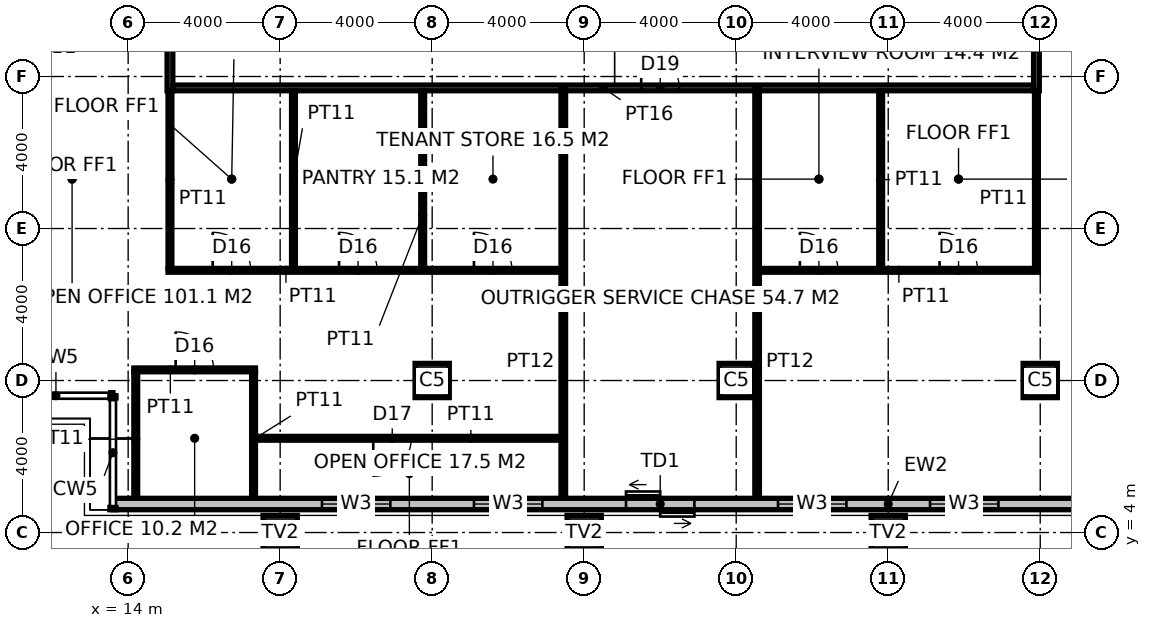
"""IFC4 building model, lengths in metres.
Left out: names, types, materials, properties, quantities, classifications, styles, units other than length and angle.
Written with IfcOpenShell. Run it as: python <this file> out.ifc"""

import sys

from ifc_helpers import new_model, si_unit, direction, frame, frame_2d, origin, origin_2d, place, context, subcontext, project, spatial, rectangle, hollow_rectangle, extrude, element, fill, save


model = new_model("IFC4")
c1 = context("Model", 3, precision=1e-05, world=origin(), true_north=direction((0.0, 1.0)))
c2 = subcontext(c1, "Body", "Model", "MODEL_VIEW")
j1 = project(units=[si_unit("LENGTHUNIT", "METRE"), si_unit("PLANEANGLEUNIT", "RADIAN")], contexts=[c1])
p1 = place(None, origin())
s1 = spatial("IfcSite", under=j1, at=p1, CompositionType="ELEMENT")
p2 = place(p1, origin())
s2 = spatial("IfcBuilding", under=s1, at=p2, CompositionType="ELEMENT")
p3 = place(p2, frame((0.0, 0.0, 105.4)))
s3 = spatial("IfcBuildingStorey", under=s2, at=p3, CompositionType="ELEMENT", Elevation=105.4)
for number, where, z_axis, x_axis in (
    (1, (18.0, 4.0, 0.0), (0.0, 0.0, 1.0), (1.0, 0.0, 0.0)),
    (2, (26.0, 4.0, 0.0), (0.0, 0.0, 1.0), (1.0, 0.0, 0.0)),
    (3, (34.0, 4.0, 0.0), (0.0, 0.0, 1.0), (1.0, 0.0, 0.0)),
):
    element("IfcColumn", number, at=place(p3, frame(where, z_axis=z_axis, x_axis=x_axis)), inside=s3, PredefinedType="USERDEFINED", context=c2, shape_type="SweptSolid", body=[
        extrude(hollow_rectangle(XDim=0.9, YDim=0.9, WallThickness=0.1, at=origin_2d()), origin(), (0.0, 0.0, 1.0), 4.0),
    ])
for number, where, z_axis, x_axis in (
    (4, (22.0, 8.0, 0.0), (0.0, 0.0, 1.0), (1.0, 0.0, 0.0)),
    (5, (30.0, 8.0, 0.0), (0.0, 0.0, 1.0), (1.0, 0.0, 0.0)),
    (6, (38.0, 8.0, 0.0), (0.0, 0.0, 1.0), (1.0, 0.0, 0.0)),
):
    element("IfcColumn", number, at=place(p3, frame(where, z_axis=z_axis, x_axis=x_axis)), inside=s3, PredefinedType="COLUMN", context=c2, shape_type="SweptSolid", body=[
        extrude(hollow_rectangle(XDim=0.9, YDim=0.9, WallThickness=0.1, at=origin_2d()), origin(), (0.0, 0.0, 1.0), 4.0),
    ])
p4 = place(p3, frame((15.1, 15.625, 0.0), z_axis=(0.0, 0.0, 1.0), x_axis=(0.0, 1.0, 0.0)))
e7 = element("IfcWall", 7, at=p4, inside=s3, PredefinedType="PARTITIONING", context=c2, shape_type="SweptSolid", body=[
    extrude(rectangle(XDim=22.75, YDim=0.15, at=frame_2d((11.375, 0.0))), origin(), (0.0, 0.0, 1.0), 3.85),
])
p5 = place(p4, frame((3.074, 0.0, 0.0)))
e8 = element("IfcOpeningElement", 8, at=p5, cuts=e7, PredefinedType="OPENING", context=c2, shape_type="SweptSolid", body=[
    extrude(rectangle(XDim=1.8, YDim=2.4, at=frame_2d((0.9, 1.2))), frame((0.0, 0.085, 0.0), z_axis=(0.0, -1.0, 0.0), x_axis=(1.0, 0.0, 0.0)), (0.0, 0.0, 1.0), 0.17),
])
p6 = place(p4, frame((16.876, 0.0, 0.0)))
e9 = element("IfcOpeningElement", 9, at=p6, cuts=e7, PredefinedType="OPENING", context=c2, shape_type="SweptSolid", body=[
    extrude(rectangle(XDim=1.8, YDim=2.4, at=frame_2d((0.9, 1.2))), frame((0.0, 0.085, 0.0), z_axis=(0.0, -1.0, 0.0), x_axis=(1.0, 0.0, 0.0)), (0.0, 0.0, 1.0), 0.17),
])
p7 = place(p4, frame((9.875, 0.0, 0.0)))
e10 = element("IfcOpeningElement", 10, at=p7, cuts=e7, PredefinedType="OPENING", context=c2, shape_type="SweptSolid", body=[
    extrude(rectangle(XDim=1.0, YDim=2.2, at=frame_2d((0.5, 1.1))), frame((0.0, 0.085, 0.0), z_axis=(0.0, -1.0, 0.0), x_axis=(1.0, 0.0, 0.0)), (0.0, 0.0, 1.0), 0.17),
])
p8 = place(p3, frame((37.9, 15.625, 0.0), z_axis=(0.0, 0.0, 1.0), x_axis=(0.0, 1.0, 0.0)))
e11 = element("IfcWall", 11, at=p8, inside=s3, PredefinedType="PARTITIONING", context=c2, shape_type="SweptSolid", body=[
    extrude(rectangle(XDim=22.75, YDim=0.15, at=frame_2d((11.375, 0.0))), origin(), (0.0, 0.0, 1.0), 2.65),
])
p9 = place(p8, frame((3.074, 0.0, 0.0)))
e12 = element("IfcOpeningElement", 12, at=p9, cuts=e11, PredefinedType="OPENING", context=c2, shape_type="SweptSolid", body=[
    extrude(rectangle(XDim=1.8, YDim=2.4, at=frame_2d((0.9, 1.2))), frame((0.0, 0.085, 0.0), z_axis=(0.0, -1.0, 0.0), x_axis=(1.0, 0.0, 0.0)), (0.0, 0.0, 1.0), 0.17),
])
p10 = place(p8, frame((16.876, 0.0, 0.0)))
e13 = element("IfcOpeningElement", 13, at=p10, cuts=e11, PredefinedType="OPENING", context=c2, shape_type="SweptSolid", body=[
    extrude(rectangle(XDim=1.8, YDim=2.4, at=frame_2d((0.9, 1.2))), frame((0.0, 0.085, 0.0), z_axis=(0.0, -1.0, 0.0), x_axis=(1.0, 0.0, 0.0)), (0.0, 0.0, 1.0), 0.17),
])
p11 = place(p8, frame((9.875, 0.0, 0.0)))
e14 = element("IfcOpeningElement", 14, at=p11, cuts=e11, PredefinedType="OPENING", context=c2, shape_type="SweptSolid", body=[
    extrude(rectangle(XDim=1.0, YDim=2.2, at=frame_2d((0.5, 1.1))), frame((0.0, 0.085, 0.0), z_axis=(0.0, -1.0, 0.0), x_axis=(1.0, 0.0, 0.0)), (0.0, 0.0, 1.0), 0.17),
])
p12 = place(p3, frame((15.175, 15.7, 0.0), z_axis=(0.0, 0.0, 1.0), x_axis=(1.0, 0.0, 0.0)))
e15 = element("IfcWall", 15, at=p12, inside=s3, PredefinedType="PARTITIONING", context=c2, shape_type="SweptSolid", body=[
    extrude(rectangle(XDim=22.65, YDim=0.15, at=frame_2d((11.325, 0.0))), origin(), (0.0, 0.0, 1.0), 3.85),
])
p13 = place(p12, frame((12.325, 0.0, 0.0)))
e16 = element("IfcOpeningElement", 16, at=p13, cuts=e15, PredefinedType="OPENING", context=c2, shape_type="SweptSolid", body=[
    extrude(rectangle(XDim=1.0, YDim=2.2, at=frame_2d((0.5, 1.1))), frame((0.0, 0.085, 0.0), z_axis=(0.0, -1.0, 0.0), x_axis=(1.0, 0.0, 0.0)), (0.0, 0.0, 1.0), 0.17),
])
for number, where, z_axis, x_axis in (
    (17, (25.45, 4.68, 0.0), (0.0, 0.0, 1.0), (0.0, 1.0, 0.0)),
    (18, (30.55, 4.68, 0.0), (0.0, 0.0, 1.0), (0.0, 1.0, 0.0)),
):
    element("IfcWall", number, at=place(p3, frame(where, z_axis=z_axis, x_axis=x_axis)), inside=s3, PredefinedType="PARTITIONING", context=c2, shape_type="SweptSolid", body=[
        extrude(rectangle(XDim=11.02, YDim=0.12, at=frame_2d((5.51, 0.0))), origin(), (0.0, 0.0, 1.0), 2.65),
    ])
p14 = place(p3, frame((14.15, 8.28, 0.0), z_axis=(0.0, 0.0, 1.0), x_axis=(1.0, 0.0, 0.0)))
e19 = element("IfcWall", 19, at=p14, inside=s3, PredefinedType="PARTITIONING", context=c2, shape_type="SweptSolid", body=[
    extrude(rectangle(XDim=3.2, YDim=0.1, at=frame_2d((1.6, 0.0))), origin(), (0.0, 0.0, 1.0), 3.85),
])
p15 = place(p14, frame((1.1, 0.0, 0.0)))
e20 = element("IfcOpeningElement", 20, at=p15, cuts=e19, PredefinedType="OPENING", context=c2, shape_type="SweptSolid", body=[
    extrude(rectangle(XDim=1.0, YDim=2.2, at=frame_2d((0.5, 1.1))), frame((0.0, 0.06, 0.0), z_axis=(0.0, -1.0, 0.0), x_axis=(1.0, 0.0, 0.0)), (0.0, 0.0, 1.0), 0.12),
])
p16 = place(p3, frame((15.05, 10.9, 0.0), z_axis=(0.0, 0.0, 1.0), x_axis=(1.0, 0.0, 0.0)))
e21 = element("IfcWall", 21, at=p16, inside=s3, PredefinedType="PARTITIONING", context=c2, shape_type="SweptSolid", body=[
    extrude(rectangle(XDim=10.339, YDim=0.1, at=frame_2d((5.169, 0.0))), origin(), (0.0, 0.0, 1.0), 3.85),
])
p17 = place(p16, frame((1.175, 0.0, 0.0)))
e22 = element("IfcOpeningElement", 22, at=p17, cuts=e21, PredefinedType="OPENING", context=c2, shape_type="SweptSolid", body=[
    extrude(rectangle(XDim=1.0, YDim=2.2, at=frame_2d((0.5, 1.1))), frame((0.0, 0.06, 0.0), z_axis=(0.0, -1.0, 0.0), x_axis=(1.0, 0.0, 0.0)), (0.0, 0.0, 1.0), 0.12),
])
p18 = place(p16, frame((4.5, 0.0, 0.0)))
e23 = element("IfcOpeningElement", 23, at=p18, cuts=e21, PredefinedType="OPENING", context=c2, shape_type="SweptSolid", body=[
    extrude(rectangle(XDim=1.0, YDim=2.2, at=frame_2d((0.5, 1.1))), frame((0.0, 0.06, 0.0), z_axis=(0.0, -1.0, 0.0), x_axis=(1.0, 0.0, 0.0)), (0.0, 0.0, 1.0), 0.12),
])
p19 = place(p16, frame((8.05, 0.0, 0.0)))
e24 = element("IfcOpeningElement", 24, at=p19, cuts=e21, PredefinedType="OPENING", context=c2, shape_type="SweptSolid", body=[
    extrude(rectangle(XDim=1.0, YDim=2.2, at=frame_2d((0.5, 1.1))), frame((0.0, 0.06, 0.0), z_axis=(0.0, -1.0, 0.0), x_axis=(1.0, 0.0, 0.0)), (0.0, 0.0, 1.0), 0.12),
])
p20 = place(p3, frame((30.611, 10.9, 0.0), z_axis=(0.0, 0.0, 1.0), x_axis=(1.0, 0.0, 0.0)))
e25 = element("IfcWall", 25, at=p20, inside=s3, PredefinedType="PARTITIONING", context=c2, shape_type="SweptSolid", body=[
    extrude(rectangle(XDim=7.339, YDim=0.1, at=frame_2d((3.669, 0.0))), origin(), (0.0, 0.0, 1.0), 3.85),
])
p21 = place(p20, frame((1.065, 0.0, 0.0)))
e26 = element("IfcOpeningElement", 26, at=p21, cuts=e25, PredefinedType="OPENING", context=c2, shape_type="SweptSolid", body=[
    extrude(rectangle(XDim=1.0, YDim=2.2, at=frame_2d((0.5, 1.1))), frame((0.0, 0.06, 0.0), z_axis=(0.0, -1.0, 0.0), x_axis=(1.0, 0.0, 0.0)), (0.0, 0.0, 1.0), 0.12),
])
p22 = place(p20, frame((4.74, 0.0, 0.0)))
e27 = element("IfcOpeningElement", 27, at=p22, cuts=e25, PredefinedType="OPENING", context=c2, shape_type="SweptSolid", body=[
    extrude(rectangle(XDim=1.0, YDim=2.2, at=frame_2d((0.5, 1.1))), frame((0.0, 0.06, 0.0), z_axis=(0.0, -1.0, 0.0), x_axis=(1.0, 0.0, 0.0)), (0.0, 0.0, 1.0), 0.12),
])
p23 = place(p3, frame((14.2, 4.68, 0.0), z_axis=(0.0, 0.0, 1.0), x_axis=(0.0, 1.0, 0.0)))
e28 = element("IfcWall", 28, at=p23, inside=s3, PredefinedType="PARTITIONING", context=c2, shape_type="SweptSolid", body=[
    extrude(rectangle(XDim=3.55, YDim=0.1, at=frame_2d((1.775, 0.0))), origin(), (0.0, 0.0, 1.0), 2.65),
])
p24 = place(p3, frame((15.1, 10.95, 0.0), z_axis=(0.0, 0.0, 1.0), x_axis=(0.0, 1.0, 0.0)))
e29 = element("IfcWall", 29, at=p24, inside=s3, PredefinedType="PARTITIONING", context=c2, shape_type="SweptSolid", body=[
    extrude(rectangle(XDim=4.675, YDim=0.1, at=frame_2d((2.337, 0.0))), origin(), (0.0, 0.0, 1.0), 3.85),
])
p25 = place(p3, frame((17.3, 4.68, 0.0), z_axis=(0.0, 0.0, 1.0), x_axis=(0.0, 1.0, 0.0)))
e30 = element("IfcWall", 30, at=p25, inside=s3, PredefinedType="PARTITIONING", context=c2, shape_type="SweptSolid", body=[
    extrude(rectangle(XDim=3.55, YDim=0.1, at=frame_2d((1.775, 0.0))), origin(), (0.0, 0.0, 1.0), 3.85),
])
for number, where, z_axis, x_axis in (
    (31, (18.35, 10.95, 0.0), (0.0, 0.0, 1.0), (0.0, 1.0, 0.0)),
    (32, (21.75, 10.95, 0.0), (0.0, 0.0, 1.0), (0.0, 1.0, 0.0)),
    (33, (33.801, 10.95, 0.0), (0.0, 0.0, 1.0), (0.0, 1.0, 0.0)),
    (34, (37.9, 10.95, 0.0), (0.0, 0.0, 1.0), (0.0, 1.0, 0.0)),
):
    element("IfcWall", number, at=place(p3, frame(where, z_axis=z_axis, x_axis=x_axis)), inside=s3, PredefinedType="PARTITIONING", context=c2, shape_type="SweptSolid", body=[
        extrude(rectangle(XDim=4.675, YDim=0.1, at=frame_2d((2.337, 0.0))), origin(), (0.0, 0.0, 1.0), 2.65),
    ])
p26 = place(p3, frame((25.449, 6.48, 0.0), z_axis=(0.0, 0.0, 1.0), x_axis=(-1.0, 0.0, 0.0)))
e35 = element("IfcWall", 35, at=p26, inside=s3, PredefinedType="PARTITIONING", context=c2, shape_type="SweptSolid", body=[
    extrude(rectangle(XDim=8.099, YDim=0.1, at=frame_2d((4.049, 0.0))), origin(), (0.0, 0.0, 1.0), 3.85),
])
p27 = place(p26, frame((4.0, 0.0, 0.0)))
e36 = element("IfcOpeningElement", 36, at=p27, cuts=e35, PredefinedType="OPENING", context=c2, shape_type="SweptSolid", body=[
    extrude(rectangle(XDim=1.0, YDim=2.2, at=frame_2d((0.5, 1.1))), frame((0.0, 0.06, 0.0), z_axis=(0.0, -1.0, 0.0), x_axis=(1.0, 0.0, 0.0)), (0.0, 0.0, 1.0), 0.12),
])
p28 = place(p3, frame((13.6, 4.75, 0.0), z_axis=(0.0, 0.0, 1.0), x_axis=(1.0, 0.0, 0.0)))
e37 = element("IfcWall", 37, at=p28, inside=s3, PredefinedType="ELEMENTEDWALL", context=c2, shape_type="SweptSolid", body=[
    extrude(rectangle(XDim=40.8, YDim=0.3, at=frame_2d((20.4, 0.0))), origin(), (0.0, 0.0, 1.0), 3.85),
])
p29 = place(p28, frame((5.5, 0.0, 0.8)))
e38 = element("IfcOpeningElement", 38, at=p29, cuts=e37, PredefinedType="OPENING", context=c2, shape_type="SweptSolid", body=[
    extrude(rectangle(XDim=1.8, YDim=2.4, at=frame_2d((0.9, 1.2))), frame((0.0, 0.16, 0.0), z_axis=(0.0, -1.0, 0.0), x_axis=(1.0, 0.0, 0.0)), (0.0, 0.0, 1.0), 0.32),
])
p30 = place(p28, frame((9.5, 0.0, 0.8)))
e39 = element("IfcOpeningElement", 39, at=p30, cuts=e37, PredefinedType="OPENING", context=c2, shape_type="SweptSolid", body=[
    extrude(rectangle(XDim=1.8, YDim=2.4, at=frame_2d((0.9, 1.2))), frame((0.0, 0.16, 0.0), z_axis=(0.0, -1.0, 0.0), x_axis=(1.0, 0.0, 0.0)), (0.0, 0.0, 1.0), 0.32),
])
p31 = place(p28, frame((13.5, 0.0, 0.0)))
e40 = element("IfcOpeningElement", 40, at=p31, cuts=e37, PredefinedType="OPENING", context=c2, shape_type="SweptSolid", body=[
    extrude(rectangle(XDim=1.8, YDim=2.4, at=frame_2d((0.9, 1.2))), frame((0.0, 0.16, 0.0), z_axis=(0.0, -1.0, 0.0), x_axis=(1.0, 0.0, 0.0)), (0.0, 0.0, 1.0), 0.32),
])
p32 = place(p28, frame((17.5, 0.0, 0.8)))
e41 = element("IfcOpeningElement", 41, at=p32, cuts=e37, PredefinedType="OPENING", context=c2, shape_type="SweptSolid", body=[
    extrude(rectangle(XDim=1.8, YDim=2.4, at=frame_2d((0.9, 1.2))), frame((0.0, 0.16, 0.0), z_axis=(0.0, -1.0, 0.0), x_axis=(1.0, 0.0, 0.0)), (0.0, 0.0, 1.0), 0.32),
])
p33 = place(p28, frame((21.5, 0.0, 0.8)))
e42 = element("IfcOpeningElement", 42, at=p33, cuts=e37, PredefinedType="OPENING", context=c2, shape_type="SweptSolid", body=[
    extrude(rectangle(XDim=1.8, YDim=2.4, at=frame_2d((0.9, 1.2))), frame((0.0, 0.16, 0.0), z_axis=(0.0, -1.0, 0.0), x_axis=(1.0, 0.0, 0.0)), (0.0, 0.0, 1.0), 0.32),
])
p34 = place(p28, frame((25.5, 0.0, 0.8)))
e43 = element("IfcOpeningElement", 43, at=p34, cuts=e37, PredefinedType="OPENING", context=c2, shape_type="SweptSolid", body=[
    extrude(rectangle(XDim=1.8, YDim=2.4, at=frame_2d((0.9, 1.2))), frame((0.0, 0.16, 0.0), z_axis=(0.0, -1.0, 0.0), x_axis=(1.0, 0.0, 0.0)), (0.0, 0.0, 1.0), 0.32),
])
p35 = place(p28, frame((29.5, 0.0, 0.0)))
e44 = element("IfcOpeningElement", 44, at=p35, cuts=e37, PredefinedType="OPENING", context=c2, shape_type="SweptSolid", body=[
    extrude(rectangle(XDim=1.8, YDim=2.4, at=frame_2d((0.9, 1.2))), frame((0.0, 0.16, 0.0), z_axis=(0.0, -1.0, 0.0), x_axis=(1.0, 0.0, 0.0)), (0.0, 0.0, 1.0), 0.32),
])
p36 = place(p28, frame((33.5, 0.0, 0.8)))
e45 = element("IfcOpeningElement", 45, at=p36, cuts=e37, PredefinedType="OPENING", context=c2, shape_type="SweptSolid", body=[
    extrude(rectangle(XDim=1.8, YDim=2.4, at=frame_2d((0.9, 1.2))), frame((0.0, 0.16, 0.0), z_axis=(0.0, -1.0, 0.0), x_axis=(1.0, 0.0, 0.0)), (0.0, 0.0, 1.0), 0.32),
])
p37 = place(p13, origin())
e46 = element("IfcDoor", 46, at=p37, inside=s3, OperationType="SINGLE_SWING_LEFT", PredefinedType="DOOR", context=c2, shape_type="SweptSolid", body=[
    extrude(rectangle(XDim=1.0, YDim=2.2, at=frame_2d((0.5, 1.1))), frame((0.0, 0.025, 0.0), z_axis=(0.0, -1.0, 0.0), x_axis=(1.0, 0.0, 0.0)), (0.0, 0.0, 1.0), 0.05),
])
fill(e16, e46)
p38 = place(p17, origin())
e47 = element("IfcDoor", 47, at=p38, inside=s3, OperationType="SINGLE_SWING_LEFT", PredefinedType="DOOR", context=c2, shape_type="SweptSolid", body=[
    extrude(rectangle(XDim=1.0, YDim=2.2, at=frame_2d((0.5, 1.1))), frame((0.0, 0.025, 0.0), z_axis=(0.0, -1.0, 0.0), x_axis=(1.0, 0.0, 0.0)), (0.0, 0.0, 1.0), 0.05),
])
fill(e22, e47)
p39 = place(p18, origin())
e48 = element("IfcDoor", 48, at=p39, inside=s3, OperationType="SINGLE_SWING_LEFT", PredefinedType="DOOR", context=c2, shape_type="SweptSolid", body=[
    extrude(rectangle(XDim=1.0, YDim=2.2, at=frame_2d((0.5, 1.1))), frame((0.0, 0.025, 0.0), z_axis=(0.0, -1.0, 0.0), x_axis=(1.0, 0.0, 0.0)), (0.0, 0.0, 1.0), 0.05),
])
fill(e23, e48)
p40 = place(p19, origin())
e49 = element("IfcDoor", 49, at=p40, inside=s3, OperationType="SINGLE_SWING_LEFT", PredefinedType="DOOR", context=c2, shape_type="SweptSolid", body=[
    extrude(rectangle(XDim=1.0, YDim=2.2, at=frame_2d((0.5, 1.1))), frame((0.0, 0.025, 0.0), z_axis=(0.0, -1.0, 0.0), x_axis=(1.0, 0.0, 0.0)), (0.0, 0.0, 1.0), 0.05),
])
fill(e24, e49)
p41 = place(p21, origin())
e50 = element("IfcDoor", 50, at=p41, inside=s3, OperationType="SINGLE_SWING_LEFT", PredefinedType="DOOR", context=c2, shape_type="SweptSolid", body=[
    extrude(rectangle(XDim=1.0, YDim=2.2, at=frame_2d((0.5, 1.1))), frame((0.0, 0.025, 0.0), z_axis=(0.0, -1.0, 0.0), x_axis=(1.0, 0.0, 0.0)), (0.0, 0.0, 1.0), 0.05),
])
fill(e26, e50)
p42 = place(p22, origin())
e51 = element("IfcDoor", 51, at=p42, inside=s3, OperationType="SINGLE_SWING_LEFT", PredefinedType="DOOR", context=c2, shape_type="SweptSolid", body=[
    extrude(rectangle(XDim=1.0, YDim=2.2, at=frame_2d((0.5, 1.1))), frame((0.0, 0.025, 0.0), z_axis=(0.0, -1.0, 0.0), x_axis=(1.0, 0.0, 0.0)), (0.0, 0.0, 1.0), 0.05),
])
fill(e27, e51)
p43 = place(p15, origin())
e52 = element("IfcDoor", 52, at=p43, inside=s3, OperationType="SINGLE_SWING_LEFT", PredefinedType="DOOR", context=c2, shape_type="SweptSolid", body=[
    extrude(rectangle(XDim=1.0, YDim=2.2, at=frame_2d((0.5, 1.1))), frame((0.0, 0.025, 0.0), z_axis=(0.0, -1.0, 0.0), x_axis=(1.0, 0.0, 0.0)), (0.0, 0.0, 1.0), 0.05),
])
fill(e20, e52)
p44 = place(p27, origin())
e53 = element("IfcDoor", 53, at=p44, inside=s3, OperationType="SINGLE_SWING_RIGHT", PredefinedType="DOOR", context=c2, shape_type="SweptSolid", body=[
    extrude(rectangle(XDim=1.0, YDim=2.2, at=frame_2d((0.5, 1.1))), frame((0.0, 0.025, 0.0), z_axis=(0.0, -1.0, 0.0), x_axis=(1.0, 0.0, 0.0)), (0.0, 0.0, 1.0), 0.05),
])
fill(e36, e53)
p45 = place(p29, origin())
e54 = element("IfcWindow", 54, at=p45, inside=s3, PartitioningType="SINGLE_PANEL", PredefinedType="WINDOW", context=c2, shape_type="SweptSolid", body=[
    extrude(rectangle(XDim=1.8, YDim=2.4, at=frame_2d((0.9, 1.2))), frame((0.0, 0.03, 0.0), z_axis=(0.0, -1.0, 0.0), x_axis=(1.0, 0.0, 0.0)), (0.0, 0.0, 1.0), 0.06),
])
fill(e38, e54)
p46 = place(p30, origin())
e55 = element("IfcWindow", 55, at=p46, inside=s3, PartitioningType="SINGLE_PANEL", PredefinedType="WINDOW", context=c2, shape_type="SweptSolid", body=[
    extrude(rectangle(XDim=1.8, YDim=2.4, at=frame_2d((0.9, 1.2))), frame((0.0, 0.03, 0.0), z_axis=(0.0, -1.0, 0.0), x_axis=(1.0, 0.0, 0.0)), (0.0, 0.0, 1.0), 0.06),
])
fill(e39, e55)
p47 = place(p31, origin())
e56 = element("IfcDoor", 56, at=p47, inside=s3, OperationType="DOUBLE_DOOR_SLIDING", PredefinedType="DOOR", context=c2, shape_type="SweptSolid", body=[
    extrude(rectangle(XDim=1.8, YDim=2.4, at=frame_2d((0.9, 1.2))), frame((0.0, 0.025, 0.0), z_axis=(0.0, -1.0, 0.0), x_axis=(1.0, 0.0, 0.0)), (0.0, 0.0, 1.0), 0.05),
])
fill(e40, e56)
p48 = place(p32, origin())
e57 = element("IfcWindow", 57, at=p48, inside=s3, PartitioningType="SINGLE_PANEL", PredefinedType="WINDOW", context=c2, shape_type="SweptSolid", body=[
    extrude(rectangle(XDim=1.8, YDim=2.4, at=frame_2d((0.9, 1.2))), frame((0.0, 0.03, 0.0), z_axis=(0.0, -1.0, 0.0), x_axis=(1.0, 0.0, 0.0)), (0.0, 0.0, 1.0), 0.06),
])
fill(e41, e57)
p49 = place(p33, origin())
e58 = element("IfcWindow", 58, at=p49, inside=s3, PartitioningType="SINGLE_PANEL", PredefinedType="WINDOW", context=c2, shape_type="SweptSolid", body=[
    extrude(rectangle(XDim=1.8, YDim=2.4, at=frame_2d((0.9, 1.2))), frame((0.0, 0.03, 0.0), z_axis=(0.0, -1.0, 0.0), x_axis=(1.0, 0.0, 0.0)), (0.0, 0.0, 1.0), 0.06),
])
fill(e42, e58)
save(model, sys.argv[1])
